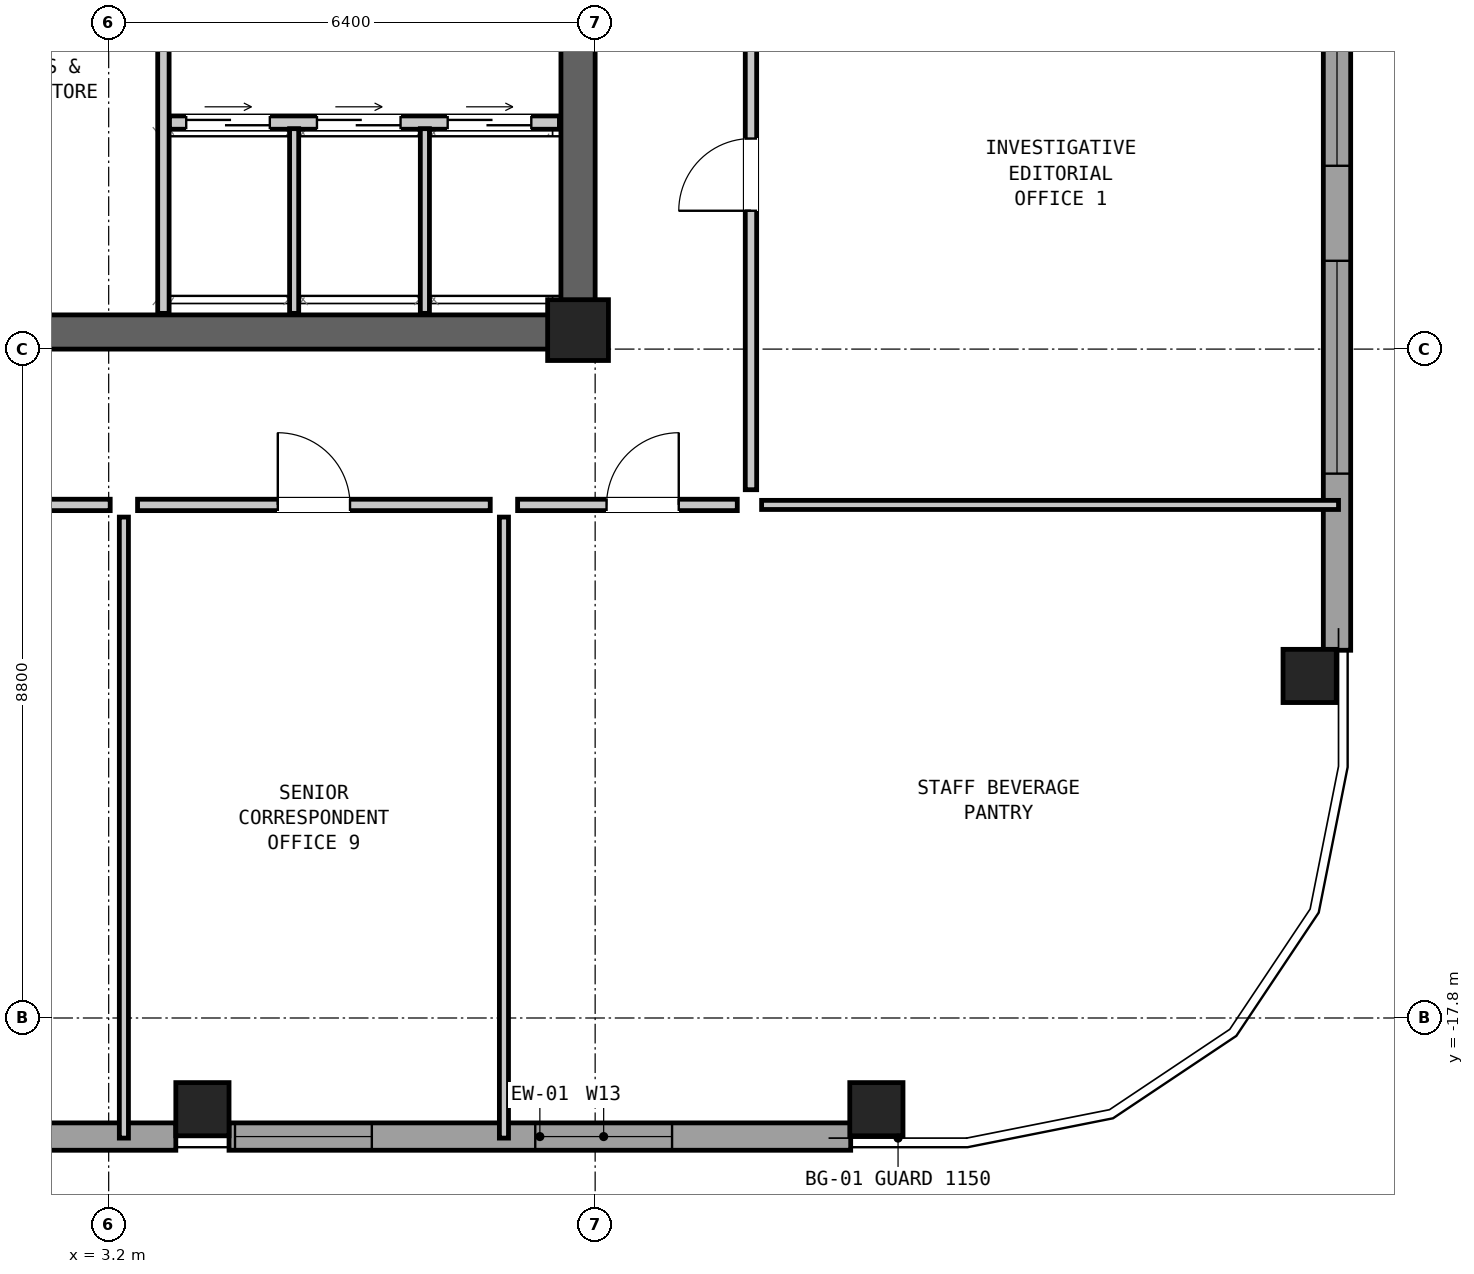
"""IFC4 building model, lengths in metres.
Left out: names, types, materials, properties, quantities, classifications, styles, units other than length and angle.
Written with IfcOpenShell. Run it as: python <this file> out.ifc"""

import sys

from ifc_helpers import new_model, si_unit, direction, frame, frame_2d, origin, origin_2d, place, context, subcontext, project, spatial, rectangle, hollow_rectangle, extrude, element, fill, save


model = new_model("IFC4")
c1 = context("Model", 3, precision=1e-05, world=origin(), true_north=direction((0.0, 1.0)))
c2 = subcontext(c1, "Body", "Model", "MODEL_VIEW")
j1 = project(units=[si_unit("LENGTHUNIT", "METRE"), si_unit("PLANEANGLEUNIT", "RADIAN")], contexts=[c1])
p1 = place(None, origin())
s1 = spatial("IfcSite", under=j1, at=p1, CompositionType="ELEMENT")
p2 = place(p1, origin())
s2 = spatial("IfcBuilding", under=s1, at=p2, CompositionType="ELEMENT")
p3 = place(p2, frame((0.0, 0.0, 208.65)))
s3 = spatial("IfcBuildingStorey", under=s2, at=p3, CompositionType="ELEMENT", Elevation=208.65)
p4 = place(p3, frame((-9.6, -8.775, 0.0), z_axis=(0.0, 0.0, 1.0), x_axis=(1.0, 0.0, 0.0)))
e1 = element("IfcWall", 1, at=p4, inside=s3, PredefinedType="SHEAR", context=c2, shape_type="SweptSolid", body=[
    extrude(rectangle(XDim=19.2, YDim=0.45, at=frame_2d((9.6, 0.0))), origin(), (0.0, 0.0, 1.0), 3.05),
])
p5 = place(p3, frame((9.375, -9.0, 0.0), z_axis=(0.0, 0.0, 1.0), x_axis=(0.0, 1.0, 0.0)))
e2 = element("IfcWall", 2, at=p5, inside=s3, PredefinedType="SHEAR", context=c2, shape_type="SweptSolid", body=[
    extrude(rectangle(XDim=6.6, YDim=0.45, at=frame_2d((3.3, 0.0))), origin(), (0.0, 0.0, 1.0), 3.05),
])
for number, where, z_axis, x_axis in (
    (3, (4.433, -19.0, 0.0), (0.0, 0.0, 1.0), (1.0, 0.0, 0.0)),
    (4, (13.3, -19.0, 0.0), (0.0, 0.0, 1.0), (1.0, 0.0, 0.0)),
    (5, (19.0, -13.3, 0.0), (0.0, 0.0, 1.0), (0.0, 1.0, 0.0)),
):
    element("IfcColumn", number, at=place(p3, frame(where, z_axis=z_axis, x_axis=x_axis)), inside=s3, PredefinedType="COLUMN", context=c2, shape_type="SweptSolid", body=[
        extrude(hollow_rectangle(XDim=0.7, YDim=0.7, WallThickness=0.045, at=origin_2d()), origin(), (0.0, 0.0, 1.0), 3.05),
    ])
p6 = place(p3, frame((9.375, -8.75, 0.0), z_axis=(0.0, 0.0, 1.0), x_axis=(1.0, 0.0, 0.0)))
e6 = element("IfcColumn", 6, at=p6, inside=s3, PredefinedType="COLUMN", context=c2, shape_type="SweptSolid", body=[
    extrude(rectangle(XDim=0.8, YDim=0.8, at=origin_2d()), origin(), (0.0, 0.0, 1.0), 3.05),
])
p7 = place(p3, frame((12.962, -19.36, 0.0), z_axis=(0.0, 0.0, 1.0), x_axis=(-1.0, 0.0, 0.0)))
e7 = element("IfcWall", 7, at=p7, inside=s3, PredefinedType="SOLIDWALL", context=c2, shape_type="SweptSolid", body=[
    extrude(rectangle(XDim=8.179, YDim=0.36, at=frame_2d((4.089, 0.0))), origin(), (0.0, 0.0, 1.0), 2.374),
])
p8 = place(p7, frame((2.35, 0.0, 0.2)))
e8 = element("IfcOpeningElement", 8, at=p8, cuts=e7, PredefinedType="OPENING", context=c2, shape_type="SweptSolid", body=[
    extrude(rectangle(XDim=1.8, YDim=1.1, at=frame_2d((0.9, 0.55))), frame((0.0, 0.192, 0.0), z_axis=(0.0, -1.0, 0.0), x_axis=(1.0, 0.0, 0.0)), (0.0, 0.0, 1.0), 0.384),
])
p9 = place(p7, frame((6.3, 0.0, 1.25)))
e9 = element("IfcOpeningElement", 9, at=p9, cuts=e7, PredefinedType="OPENING", context=c2, shape_type="SweptSolid", body=[
    extrude(rectangle(XDim=1.8, YDim=0.95, at=frame_2d((0.9, 0.475))), frame((0.0, 0.192, 0.0), z_axis=(0.0, -1.0, 0.0), x_axis=(1.0, 0.0, 0.0)), (0.0, 0.0, 1.0), 0.384),
])
p10 = place(p3, frame((4.083, -19.36, 0.0), z_axis=(0.0, 0.0, 1.0), x_axis=(-1.0, 0.0, 0.0)))
e10 = element("IfcWall", 10, at=p10, inside=s3, PredefinedType="SOLIDWALL", context=c2, shape_type="SweptSolid", body=[
    extrude(rectangle(XDim=8.167, YDim=0.36, at=frame_2d((4.083, 0.0))), origin(), (0.0, 0.0, 1.0), 2.374),
])
p11 = place(p10, frame((2.571, 0.0, 0.2)))
e11 = element("IfcOpeningElement", 11, at=p11, cuts=e10, PredefinedType="OPENING", context=c2, shape_type="SweptSolid", body=[
    extrude(rectangle(XDim=3.0, YDim=1.0, at=frame_2d((1.5, 0.5))), frame((0.0, 0.192, 0.0), z_axis=(0.0, -1.0, 0.0), x_axis=(1.0, 0.0, 0.0)), (0.0, 0.0, 1.0), 0.384),
])
p12 = place(p10, frame((6.771, 0.0, 1.2)))
e12 = element("IfcOpeningElement", 12, at=p12, cuts=e10, PredefinedType="OPENING", context=c2, shape_type="SweptSolid", body=[
    extrude(rectangle(XDim=1.35, YDim=1.0, at=frame_2d((0.675, 0.5))), frame((0.0, 0.192, 0.0), z_axis=(0.0, -1.0, 0.0), x_axis=(1.0, 0.0, 0.0)), (0.0, 0.0, 1.0), 0.384),
])
p13 = place(p3, frame((19.36, -4.783, 0.0), z_axis=(0.0, 0.0, 1.0), x_axis=(0.0, -1.0, 0.0)))
e13 = element("IfcWall", 13, at=p13, inside=s3, PredefinedType="SOLIDWALL", context=c2, shape_type="SweptSolid", body=[
    extrude(rectangle(XDim=8.179, YDim=0.36, at=frame_2d((4.089, 0.0))), origin(), (0.0, 0.0, 1.0), 2.374),
])
p14 = place(p13, frame((0.055, 0.0, 1.1)))
e14 = element("IfcOpeningElement", 14, at=p14, cuts=e13, PredefinedType="OPENING", context=c2, shape_type="SweptSolid", body=[
    extrude(rectangle(XDim=1.75, YDim=1.1, at=frame_2d((0.875, 0.55))), frame((0.0, 0.192, 0.0), z_axis=(0.0, -1.0, 0.0), x_axis=(1.0, 0.0, 0.0)), (0.0, 0.0, 1.0), 0.384),
])
p15 = place(p13, frame((3.055, 0.0, 0.2)))
e15 = element("IfcOpeningElement", 15, at=p15, cuts=e13, PredefinedType="OPENING", context=c2, shape_type="SweptSolid", body=[
    extrude(rectangle(XDim=2.8, YDim=1.15, at=frame_2d((1.4, 0.575))), frame((0.0, 0.192, 0.0), z_axis=(0.0, -1.0, 0.0), x_axis=(1.0, 0.0, 0.0)), (0.0, 0.0, 1.0), 0.384),
])
p16 = place(p3, frame((3.92, -8.53, 0.0), z_axis=(0.0, 0.0, 1.0), x_axis=(0.0, 1.0, 0.0)))
e16 = element("IfcWall", 16, at=p16, inside=s3, PredefinedType="PARTITIONING", context=c2, shape_type="SweptSolid", body=[
    extrude(rectangle(XDim=5.66, YDim=0.15, at=frame_2d((2.83, 0.0))), origin(), (0.0, 0.0, 1.0), 2.86),
])
p17 = place(p3, frame((4.0, -6.02, 0.0), z_axis=(0.0, 0.0, 1.0), x_axis=(1.0, 0.0, 0.0)))
e17 = element("IfcWall", 17, at=p17, inside=s3, PredefinedType="PARTITIONING", context=c2, shape_type="SweptSolid", body=[
    extrude(rectangle(XDim=5.13, YDim=0.175, at=frame_2d((2.565, 0.0))), origin(), (0.0, 0.0, 1.0), 2.86),
])
p18 = place(p17, frame((0.22, 0.0, 0.0)))
e18 = element("IfcOpeningElement", 18, at=p18, cuts=e17, PredefinedType="OPENING", context=c2, shape_type="SweptSolid", body=[
    extrude(rectangle(XDim=1.1, YDim=2.06, at=frame_2d((0.55, 1.03))), frame((0.0, 0.1, 0.0), z_axis=(0.0, -1.0, 0.0), x_axis=(1.0, 0.0, 0.0)), (0.0, 0.0, 1.0), 0.199),
])
p19 = place(p17, frame((1.94, 0.0, 0.0)))
e19 = element("IfcOpeningElement", 19, at=p19, cuts=e17, PredefinedType="OPENING", context=c2, shape_type="SweptSolid", body=[
    extrude(rectangle(XDim=1.1, YDim=2.06, at=frame_2d((0.55, 1.03))), frame((0.0, 0.1, 0.0), z_axis=(0.0, -1.0, 0.0), x_axis=(1.0, 0.0, 0.0)), (0.0, 0.0, 1.0), 0.199),
])
p20 = place(p17, frame((3.66, 0.0, 0.0)))
e20 = element("IfcOpeningElement", 20, at=p20, cuts=e17, PredefinedType="OPENING", context=c2, shape_type="SweptSolid", body=[
    extrude(rectangle(XDim=1.1, YDim=2.06, at=frame_2d((0.55, 1.03))), frame((0.0, 0.1, 0.0), z_axis=(0.0, -1.0, 0.0), x_axis=(1.0, 0.0, 0.0)), (0.0, 0.0, 1.0), 0.199),
])
for number, where, z_axis, x_axis in (
    (21, (5.64, -8.53, 0.0), (0.0, 0.0, 1.0), (0.0, 1.0, 0.0)),
    (22, (7.36, -8.53, 0.0), (0.0, 0.0, 1.0), (0.0, 1.0, 0.0)),
):
    element("IfcWall", number, at=place(p3, frame(where, z_axis=z_axis, x_axis=x_axis)), inside=s3, PredefinedType="PARTITIONING", context=c2, shape_type="SweptSolid", body=[
        extrude(rectangle(XDim=2.43, YDim=0.12, at=frame_2d((1.215, 0.0))), origin(), (0.0, 0.0, 1.0), 2.86),
    ])
p21 = place(p3, frame((11.79, -11.05, 0.0), z_axis=(0.0, 0.0, 1.0), x_axis=(1.0, 0.0, 0.0)))
e23 = element("IfcWall", 23, at=p21, inside=s3, PredefinedType="PARTITIONING", context=c2, shape_type="SweptSolid", body=[
    extrude(rectangle(XDim=7.59, YDim=0.12, at=frame_2d((3.795, 0.0))), origin(), (0.0, 0.0, 1.0), 2.86),
])
p22 = place(p3, frame((3.4, -19.38, 0.0), z_axis=(0.0, 0.0, 1.0), x_axis=(0.0, 1.0, 0.0)))
e24 = element("IfcWall", 24, at=p22, inside=s3, PredefinedType="PARTITIONING", context=c2, shape_type="SweptSolid", body=[
    extrude(rectangle(XDim=8.17, YDim=0.12, at=frame_2d((4.085, 0.0))), origin(), (0.0, 0.0, 1.0), 2.381),
])
p23 = place(p3, frame((8.4, -19.38, 0.0), z_axis=(0.0, 0.0, 1.0), x_axis=(0.0, 1.0, 0.0)))
e25 = element("IfcWall", 25, at=p23, inside=s3, PredefinedType="PARTITIONING", context=c2, shape_type="SweptSolid", body=[
    extrude(rectangle(XDim=8.17, YDim=0.12, at=frame_2d((4.085, 0.0))), origin(), (0.0, 0.0, 1.0), 2.86),
])
p24 = place(p3, frame((-2.02, -11.05, 0.0), z_axis=(0.0, 0.0, 1.0), x_axis=(1.0, 0.0, 0.0)))
e26 = element("IfcWall", 26, at=p24, inside=s3, PredefinedType="PARTITIONING", context=c2, shape_type="SweptSolid", body=[
    extrude(rectangle(XDim=5.24, YDim=0.15, at=frame_2d((2.62, 0.0))), origin(), (0.0, 0.0, 1.0), 2.86),
])
p25 = place(p24, frame((2.145, 0.0, 0.0)))
e27 = element("IfcOpeningElement", 27, at=p25, cuts=e26, PredefinedType="OPENING", context=c2, shape_type="SweptSolid", body=[
    extrude(rectangle(XDim=0.95, YDim=2.1, at=frame_2d((0.475, 1.05))), frame((0.0, 0.087, 0.0), z_axis=(0.0, -1.0, 0.0), x_axis=(1.0, 0.0, 0.0)), (0.0, 0.0, 1.0), 0.174),
])
p26 = place(p3, frame((3.58, -11.05, 0.0), z_axis=(0.0, 0.0, 1.0), x_axis=(1.0, 0.0, 0.0)))
e28 = element("IfcWall", 28, at=p26, inside=s3, PredefinedType="PARTITIONING", context=c2, shape_type="SweptSolid", body=[
    extrude(rectangle(XDim=4.64, YDim=0.15, at=frame_2d((2.32, 0.0))), origin(), (0.0, 0.0, 1.0), 2.86),
])
p27 = place(p26, frame((1.845, 0.0, 0.0)))
e29 = element("IfcOpeningElement", 29, at=p27, cuts=e28, PredefinedType="OPENING", context=c2, shape_type="SweptSolid", body=[
    extrude(rectangle(XDim=0.95, YDim=2.1, at=frame_2d((0.475, 1.05))), frame((0.0, 0.087, 0.0), z_axis=(0.0, -1.0, 0.0), x_axis=(1.0, 0.0, 0.0)), (0.0, 0.0, 1.0), 0.174),
])
p28 = place(p3, frame((8.58, -11.05, 0.0), z_axis=(0.0, 0.0, 1.0), x_axis=(1.0, 0.0, 0.0)))
e30 = element("IfcWall", 30, at=p28, inside=s3, PredefinedType="PARTITIONING", context=c2, shape_type="SweptSolid", body=[
    extrude(rectangle(XDim=2.89, YDim=0.15, at=frame_2d((1.445, 0.0))), origin(), (0.0, 0.0, 1.0), 2.86),
])
p29 = place(p28, frame((1.17, 0.0, 0.0)))
e31 = element("IfcOpeningElement", 31, at=p29, cuts=e30, PredefinedType="OPENING", context=c2, shape_type="SweptSolid", body=[
    extrude(rectangle(XDim=0.95, YDim=2.1, at=frame_2d((0.475, 1.05))), frame((0.0, 0.087, 0.0), z_axis=(0.0, -1.0, 0.0), x_axis=(1.0, 0.0, 0.0)), (0.0, 0.0, 1.0), 0.174),
])
p30 = place(p3, frame((11.65, -10.85, 0.0), z_axis=(0.0, 0.0, 1.0), x_axis=(0.0, 1.0, 0.0)))
e32 = element("IfcWall", 32, at=p30, inside=s3, PredefinedType="PARTITIONING", context=c2, shape_type="SweptSolid", body=[
    extrude(rectangle(XDim=8.29, YDim=0.15, at=frame_2d((4.145, 0.0))), origin(), (0.0, 0.0, 1.0), 2.86),
])
p31 = place(p30, frame((3.67, 0.0, 0.0)))
e33 = element("IfcOpeningElement", 33, at=p31, cuts=e32, PredefinedType="OPENING", context=c2, shape_type="SweptSolid", body=[
    extrude(rectangle(XDim=0.95, YDim=2.1, at=frame_2d((0.475, 1.05))), frame((0.0, 0.087, 0.0), z_axis=(0.0, -1.0, 0.0), x_axis=(1.0, 0.0, 0.0)), (0.0, 0.0, 1.0), 0.174),
])
p32 = place(p8, origin())
e34 = element("IfcWindow", 34, at=p32, inside=s3, PartitioningType="SINGLE_PANEL", PredefinedType="WINDOW", context=c2, shape_type="SweptSolid", body=[
    extrude(rectangle(XDim=1.8, YDim=1.1, at=frame_2d((0.9, 0.55))), frame((0.0, 0.03, 0.0), z_axis=(0.0, -1.0, 0.0), x_axis=(1.0, 0.0, 0.0)), (0.0, 0.0, 1.0), 0.06),
])
fill(e8, e34)
p33 = place(p9, origin())
e35 = element("IfcWindow", 35, at=p33, inside=s3, PartitioningType="SINGLE_PANEL", PredefinedType="WINDOW", context=c2, shape_type="SweptSolid", body=[
    extrude(rectangle(XDim=1.8, YDim=0.95, at=frame_2d((0.9, 0.475))), frame((0.0, 0.03, 0.0), z_axis=(0.0, -1.0, 0.0), x_axis=(1.0, 0.0, 0.0)), (0.0, 0.0, 1.0), 0.06),
])
fill(e9, e35)
p34 = place(p14, origin())
e36 = element("IfcWindow", 36, at=p34, inside=s3, PartitioningType="SINGLE_PANEL", PredefinedType="WINDOW", context=c2, shape_type="SweptSolid", body=[
    extrude(rectangle(XDim=1.75, YDim=1.1, at=frame_2d((0.875, 0.55))), frame((0.0, 0.03, 0.0), z_axis=(0.0, -1.0, 0.0), x_axis=(1.0, 0.0, 0.0)), (0.0, 0.0, 1.0), 0.06),
])
fill(e14, e36)
p35 = place(p15, origin())
e37 = element("IfcWindow", 37, at=p35, inside=s3, PartitioningType="SINGLE_PANEL", PredefinedType="WINDOW", context=c2, shape_type="SweptSolid", body=[
    extrude(rectangle(XDim=2.8, YDim=1.15, at=frame_2d((1.4, 0.575))), frame((0.0, 0.03, 0.0), z_axis=(0.0, -1.0, 0.0), x_axis=(1.0, 0.0, 0.0)), (0.0, 0.0, 1.0), 0.06),
])
fill(e15, e37)
p36 = place(p18, origin())
e38 = element("IfcDoor", 38, at=p36, inside=s3, OperationType="DOUBLE_DOOR_SLIDING", PredefinedType="DOOR", context=c2, shape_type="SweptSolid", body=[
    extrude(rectangle(XDim=1.1, YDim=2.06, at=frame_2d((0.55, 1.03))), frame((0.0, 0.025, 0.0), z_axis=(0.0, -1.0, 0.0), x_axis=(1.0, 0.0, 0.0)), (0.0, 0.0, 1.0), 0.05),
])
fill(e18, e38)
p37 = place(p19, origin())
e39 = element("IfcDoor", 39, at=p37, inside=s3, OperationType="DOUBLE_DOOR_SLIDING", PredefinedType="DOOR", context=c2, shape_type="SweptSolid", body=[
    extrude(rectangle(XDim=1.1, YDim=2.06, at=frame_2d((0.55, 1.03))), frame((0.0, 0.025, 0.0), z_axis=(0.0, -1.0, 0.0), x_axis=(1.0, 0.0, 0.0)), (0.0, 0.0, 1.0), 0.05),
])
fill(e19, e39)
p38 = place(p20, origin())
e40 = element("IfcDoor", 40, at=p38, inside=s3, OperationType="DOUBLE_DOOR_SLIDING", PredefinedType="DOOR", context=c2, shape_type="SweptSolid", body=[
    extrude(rectangle(XDim=1.1, YDim=2.06, at=frame_2d((0.55, 1.03))), frame((0.0, 0.025, 0.0), z_axis=(0.0, -1.0, 0.0), x_axis=(1.0, 0.0, 0.0)), (0.0, 0.0, 1.0), 0.05),
])
fill(e20, e40)
p39 = place(p27, origin())
e41 = element("IfcDoor", 41, at=p39, inside=s3, OperationType="SINGLE_SWING_LEFT", PredefinedType="DOOR", context=c2, shape_type="SweptSolid", body=[
    extrude(rectangle(XDim=0.95, YDim=2.1, at=frame_2d((0.475, 1.05))), frame((0.0, 0.025, 0.0), z_axis=(0.0, -1.0, 0.0), x_axis=(1.0, 0.0, 0.0)), (0.0, 0.0, 1.0), 0.05),
])
fill(e29, e41)
p40 = place(p29, origin())
e42 = element("IfcDoor", 42, at=p40, inside=s3, OperationType="SINGLE_SWING_RIGHT", PredefinedType="DOOR", context=c2, shape_type="SweptSolid", body=[
    extrude(rectangle(XDim=0.95, YDim=2.1, at=frame_2d((0.475, 1.05))), frame((0.0, 0.025, 0.0), z_axis=(0.0, -1.0, 0.0), x_axis=(1.0, 0.0, 0.0)), (0.0, 0.0, 1.0), 0.05),
])
fill(e31, e42)
p41 = place(p31, origin())
e43 = element("IfcDoor", 43, at=p41, inside=s3, OperationType="SINGLE_SWING_LEFT", PredefinedType="DOOR", context=c2, shape_type="SweptSolid", body=[
    extrude(rectangle(XDim=0.95, YDim=2.1, at=frame_2d((0.475, 1.05))), frame((0.0, 0.025, 0.0), z_axis=(0.0, -1.0, 0.0), x_axis=(1.0, 0.0, 0.0)), (0.0, 0.0, 1.0), 0.05),
])
fill(e33, e43)
save(model, sys.argv[1])
